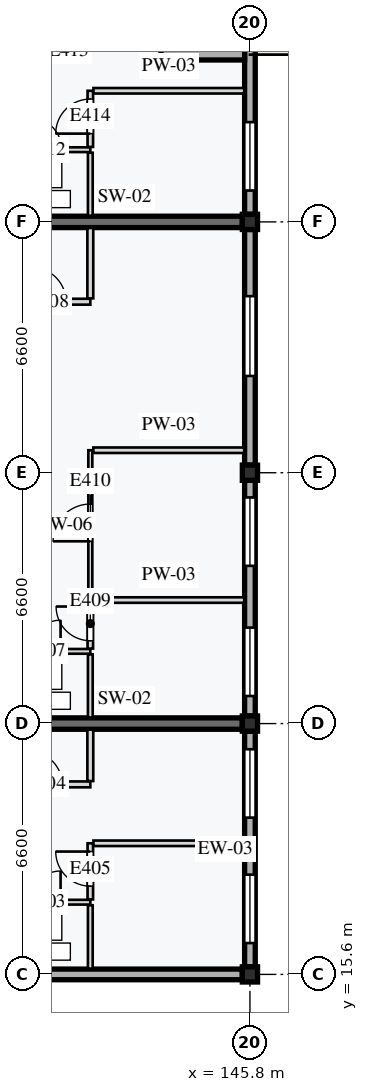
"""IFC4 building model, lengths in metres.
Left out: names, types, materials, properties, quantities, classifications, styles, units other than length and angle.
Written with IfcOpenShell. Run it as: python <this file> out.ifc"""

import sys

from ifc_helpers import new_model, si_unit, direction, frame, frame_2d, origin, origin_2d, place, context, subcontext, project, spatial, rectangle, extrude, element, fill, save


model = new_model("IFC4")
c1 = context("Model", 3, precision=1e-05, world=origin(), true_north=direction((0.0, 1.0)))
c2 = subcontext(c1, "Body", "Model", "MODEL_VIEW")
j1 = project(units=[si_unit("LENGTHUNIT", "METRE"), si_unit("PLANEANGLEUNIT", "RADIAN")], contexts=[c1])
p1 = place(None, origin())
s1 = spatial("IfcSite", under=j1, at=p1, CompositionType="ELEMENT")
p2 = place(p1, origin())
s2 = spatial("IfcBuilding", under=s1, at=p2, CompositionType="ELEMENT")
p3 = place(p2, frame((0.0, 0.0, 34.0)))
s3 = spatial("IfcBuildingStorey", under=s2, at=p3, CompositionType="ELEMENT", Elevation=34.0)
for number, where, z_axis, x_axis in (
    (1, (145.8, 15.6, 0.0), (0.0, 0.0, 1.0), (1.0, 0.0, 0.0)),
    (2, (145.8, 22.2, 0.0), (0.0, 0.0, 1.0), (1.0, 0.0, 0.0)),
    (3, (145.8, 28.8, 0.0), (0.0, 0.0, 1.0), (1.0, 0.0, 0.0)),
    (4, (145.8, 35.4, 0.0), (0.0, 0.0, 1.0), (1.0, 0.0, 0.0)),
):
    element("IfcColumn", number, at=place(p3, frame(where, z_axis=z_axis, x_axis=x_axis)), inside=s3, PredefinedType="COLUMN", context=c2, shape_type="SweptSolid", body=[
        extrude(rectangle(XDim=0.4, YDim=0.4, at=origin_2d()), origin(), (0.0, 0.0, 1.0), 3.2),
    ])
for number, where, z_axis, x_axis in (
    (5, (139.4, 22.2, 0.0), (0.0, 0.0, 1.0), (1.0, 0.0, 0.0)),
    (6, (139.4, 35.4, 0.0), (0.0, 0.0, 1.0), (1.0, 0.0, 0.0)),
):
    element("IfcWall", number, at=place(p3, frame(where, z_axis=z_axis, x_axis=x_axis)), inside=s3, PredefinedType="SHEAR", context=c2, shape_type="SweptSolid", body=[
        extrude(rectangle(XDim=6.2, YDim=0.3, at=frame_2d((3.1, 0.0))), origin(), (0.0, 0.0, 1.0), 2.97),
    ])
p4 = place(p3, frame((145.8, 15.8, 0.0), z_axis=(0.0, 0.0, 1.0), x_axis=(0.0, 1.0, 0.0)))
e7 = element("IfcWall", 7, at=p4, inside=s3, PredefinedType="STANDARD", context=c2, shape_type="SweptSolid", body=[
    extrude(rectangle(XDim=6.2, YDim=0.28, at=frame_2d((3.1, 0.0))), origin(), (0.0, 0.0, 1.0), 2.6),
])
p5 = place(p4, frame((0.625, 0.0, 0.85)))
e8 = element("IfcOpeningElement", 8, at=p5, cuts=e7, PredefinedType="OPENING", context=c2, shape_type="SweptSolid", body=[
    extrude(rectangle(XDim=1.8, YDim=1.35, at=frame_2d((0.9, 0.675))), frame((0.0, 0.15, 0.0), z_axis=(0.0, -1.0, 0.0), x_axis=(1.0, 0.0, 0.0)), (0.0, 0.0, 1.0), 0.3),
])
p6 = place(p4, frame((3.925, 0.0, 0.85)))
e9 = element("IfcOpeningElement", 9, at=p6, cuts=e7, PredefinedType="OPENING", context=c2, shape_type="SweptSolid", body=[
    extrude(rectangle(XDim=1.8, YDim=1.55, at=frame_2d((0.9, 0.775))), frame((0.0, 0.15, 0.0), z_axis=(0.0, -1.0, 0.0), x_axis=(1.0, 0.0, 0.0)), (0.0, 0.0, 1.0), 0.3),
])
p7 = place(p3, frame((145.8, 22.4, 0.0), z_axis=(0.0, 0.0, 1.0), x_axis=(0.0, 1.0, 0.0)))
e10 = element("IfcWall", 10, at=p7, inside=s3, PredefinedType="STANDARD", context=c2, shape_type="SweptSolid", body=[
    extrude(rectangle(XDim=6.2, YDim=0.28, at=frame_2d((3.1, 0.0))), origin(), (0.0, 0.0, 1.0), 2.6),
])
p8 = place(p7, frame((0.525, 0.0, 0.85)))
e11 = element("IfcOpeningElement", 11, at=p8, cuts=e10, PredefinedType="OPENING", context=c2, shape_type="SweptSolid", body=[
    extrude(rectangle(XDim=1.8, YDim=1.35, at=frame_2d((0.9, 0.675))), frame((0.0, 0.15, 0.0), z_axis=(0.0, -1.0, 0.0), x_axis=(1.0, 0.0, 0.0)), (0.0, 0.0, 1.0), 0.3),
])
p9 = place(p7, frame((3.95, 0.0, 0.85)))
e12 = element("IfcOpeningElement", 12, at=p9, cuts=e10, PredefinedType="OPENING", context=c2, shape_type="SweptSolid", body=[
    extrude(rectangle(XDim=1.8, YDim=1.35, at=frame_2d((0.9, 0.675))), frame((0.0, 0.15, 0.0), z_axis=(0.0, -1.0, 0.0), x_axis=(1.0, 0.0, 0.0)), (0.0, 0.0, 1.0), 0.3),
])
p10 = place(p3, frame((145.8, 29.0, 0.0), z_axis=(0.0, 0.0, 1.0), x_axis=(0.0, 1.0, 0.0)))
e13 = element("IfcWall", 13, at=p10, inside=s3, PredefinedType="STANDARD", context=c2, shape_type="SweptSolid", body=[
    extrude(rectangle(XDim=6.2, YDim=0.28, at=frame_2d((3.1, 0.0))), origin(), (0.0, 0.0, 1.0), 2.6),
])
p11 = place(p10, frame((2.346, 0.0, 0.85)))
e14 = element("IfcOpeningElement", 14, at=p11, cuts=e13, PredefinedType="OPENING", context=c2, shape_type="SweptSolid", body=[
    extrude(rectangle(XDim=2.1, YDim=1.55, at=frame_2d((1.05, 0.775))), frame((0.0, 0.15, 0.0), z_axis=(0.0, -1.0, 0.0), x_axis=(1.0, 0.0, 0.0)), (0.0, 0.0, 1.0), 0.3),
])
p12 = place(p3, frame((145.8, 35.6, 0.0), z_axis=(0.0, 0.0, 1.0), x_axis=(0.0, 1.0, 0.0)))
e15 = element("IfcWall", 15, at=p12, inside=s3, PredefinedType="STANDARD", context=c2, shape_type="SweptSolid", body=[
    extrude(rectangle(XDim=4.34, YDim=0.28, at=frame_2d((2.17, 0.0))), origin(), (0.0, 0.0, 1.0), 2.6),
])
p13 = place(p12, frame((0.625, 0.0, 0.85)))
e16 = element("IfcOpeningElement", 16, at=p13, cuts=e15, PredefinedType="OPENING", context=c2, shape_type="SweptSolid", body=[
    extrude(rectangle(XDim=1.8, YDim=1.35, at=frame_2d((0.9, 0.675))), frame((0.0, 0.15, 0.0), z_axis=(0.0, -1.0, 0.0), x_axis=(1.0, 0.0, 0.0)), (0.0, 0.0, 1.0), 0.3),
])
p14 = place(p3, frame((145.66, 39.8, 0.0), z_axis=(0.0, 0.0, 1.0), x_axis=(-1.0, 0.0, 0.0)))
e17 = element("IfcWall", 17, at=p14, inside=s3, PredefinedType="STANDARD", context=c2, shape_type="SweptSolid", body=[
    extrude(rectangle(XDim=2.2, YDim=0.28, at=frame_2d((1.1, 0.0))), origin(), (0.0, 0.0, 1.0), 2.97),
])
p15 = place(p3, frame((139.4, 15.6, 0.0), z_axis=(0.0, 0.0, 1.0), x_axis=(1.0, 0.0, 0.0)))
e18 = element("IfcWall", 18, at=p15, inside=s3, PredefinedType="STANDARD", context=c2, shape_type="SweptSolid", body=[
    extrude(rectangle(XDim=6.2, YDim=0.28, at=frame_2d((3.1, 0.0))), origin(), (0.0, 0.0, 1.0), 2.65),
])
p16 = place(p3, frame((139.298, 17.5, 0.0), z_axis=(0.0, 0.0, 1.0), x_axis=(1.0, 0.0, 0.0)))
e19 = element("IfcWall", 19, at=p16, inside=s3, PredefinedType="PARTITIONING", context=c2, shape_type="SweptSolid", body=[
    extrude(rectangle(XDim=2.302, YDim=0.125, at=frame_2d((1.151, 0.0))), origin(), (0.0, 0.0, 1.0), 2.935),
])
p17 = place(p16, frame((0.7, 0.0, 0.0)))
e20 = element("IfcOpeningElement", 20, at=p17, cuts=e19, PredefinedType="OPENING", context=c2, shape_type="SweptSolid", body=[
    extrude(rectangle(XDim=0.82, YDim=2.05, at=frame_2d((0.41, 1.025))), frame((0.0, 0.073, 0.0), z_axis=(0.0, -1.0, 0.0), x_axis=(1.0, 0.0, 0.0)), (0.0, 0.0, 1.0), 0.145),
])
p18 = place(p3, frame((141.6, 15.75, 0.0), z_axis=(0.0, 0.0, 1.0), x_axis=(0.0, 1.0, 0.0)))
e21 = element("IfcWall", 21, at=p18, inside=s3, PredefinedType="PARTITIONING", context=c2, shape_type="SweptSolid", body=[
    extrude(rectangle(XDim=1.67, YDim=0.125, at=frame_2d((0.835, 0.0))), origin(), (0.0, 0.0, 1.0), 2.935),
])
p19 = place(p3, frame((139.298, 20.6, 0.0), z_axis=(0.0, 0.0, 1.0), x_axis=(1.0, 0.0, 0.0)))
e22 = element("IfcWall", 22, at=p19, inside=s3, PredefinedType="PARTITIONING", context=c2, shape_type="SweptSolid", body=[
    extrude(rectangle(XDim=2.302, YDim=0.155, at=frame_2d((1.151, 0.0))), origin(), (0.0, 0.0, 1.0), 2.935),
])
p20 = place(p19, frame((0.7, 0.0, 0.0)))
e23 = element("IfcOpeningElement", 23, at=p20, cuts=e22, PredefinedType="OPENING", context=c2, shape_type="SweptSolid", body=[
    extrude(rectangle(XDim=0.86, YDim=2.12, at=frame_2d((0.43, 1.06))), frame((0.0, 0.087, 0.0), z_axis=(0.0, -1.0, 0.0), x_axis=(1.0, 0.0, 0.0)), (0.0, 0.0, 1.0), 0.175),
])
p21 = place(p3, frame((141.6, 20.688, 0.0), z_axis=(0.0, 0.0, 1.0), x_axis=(0.0, 1.0, 0.0)))
e24 = element("IfcWall", 24, at=p21, inside=s3, PredefinedType="PARTITIONING", context=c2, shape_type="SweptSolid", body=[
    extrude(rectangle(XDim=1.353, YDim=0.155, at=frame_2d((0.676, 0.0))), origin(), (0.0, 0.0, 1.0), 2.935),
])
p22 = place(p3, frame((141.6, 17.573, 0.0), z_axis=(0.0, 0.0, 1.0), x_axis=(0.0, 1.0, 0.0)))
e25 = element("IfcWall", 25, at=p22, inside=s3, PredefinedType="PARTITIONING", context=c2, shape_type="SweptSolid", body=[
    extrude(rectangle(XDim=1.478, YDim=0.145, at=frame_2d((0.739, 0.0))), origin(), (0.0, 0.0, 1.0), 2.935),
])
p23 = place(p22, frame((0.35, 0.0, 0.0)))
e26 = element("IfcOpeningElement", 26, at=p23, cuts=e25, PredefinedType="OPENING", context=c2, shape_type="SweptSolid", body=[
    extrude(rectangle(XDim=0.91, YDim=2.14, at=frame_2d((0.455, 1.07))), frame((0.0, 0.083, 0.0), z_axis=(0.0, -1.0, 0.0), x_axis=(1.0, 0.0, 0.0)), (0.0, 0.0, 1.0), 0.165),
])
p24 = place(p3, frame((141.683, 19.05, 0.0), z_axis=(0.0, 0.0, 1.0), x_axis=(1.0, 0.0, 0.0)))
e27 = element("IfcWall", 27, at=p24, inside=s3, PredefinedType="PARTITIONING", context=c2, shape_type="SweptSolid", body=[
    extrude(rectangle(XDim=3.967, YDim=0.145, at=frame_2d((1.984, 0.0))), origin(), (0.0, 0.0, 1.0), 2.935),
])
p25 = place(p3, frame((139.298, 24.1, 0.0), z_axis=(0.0, 0.0, 1.0), x_axis=(1.0, 0.0, 0.0)))
e28 = element("IfcWall", 28, at=p25, inside=s3, PredefinedType="PARTITIONING", context=c2, shape_type="SweptSolid", body=[
    extrude(rectangle(XDim=2.302, YDim=0.125, at=frame_2d((1.151, 0.0))), origin(), (0.0, 0.0, 1.0), 2.935),
])
p26 = place(p25, frame((0.7, 0.0, 0.0)))
e29 = element("IfcOpeningElement", 29, at=p26, cuts=e28, PredefinedType="OPENING", context=c2, shape_type="SweptSolid", body=[
    extrude(rectangle(XDim=0.82, YDim=2.05, at=frame_2d((0.41, 1.025))), frame((0.0, 0.073, 0.0), z_axis=(0.0, -1.0, 0.0), x_axis=(1.0, 0.0, 0.0)), (0.0, 0.0, 1.0), 0.145),
])
p27 = place(p3, frame((141.6, 22.36, 0.0), z_axis=(0.0, 0.0, 1.0), x_axis=(0.0, 1.0, 0.0)))
e30 = element("IfcWall", 30, at=p27, inside=s3, PredefinedType="PARTITIONING", context=c2, shape_type="SweptSolid", body=[
    extrude(rectangle(XDim=1.66, YDim=0.125, at=frame_2d((0.83, 0.0))), origin(), (0.0, 0.0, 1.0), 2.935),
])
p28 = place(p3, frame((139.36, 33.3, 0.0), z_axis=(0.0, 0.0, 1.0), x_axis=(1.0, 0.0, 0.0)))
e31 = element("IfcWall", 31, at=p28, inside=s3, PredefinedType="PARTITIONING", context=c2, shape_type="SweptSolid", body=[
    extrude(rectangle(XDim=2.24, YDim=0.155, at=frame_2d((1.12, 0.0))), origin(), (0.0, 0.0, 1.0), 2.935),
])
p29 = place(p28, frame((0.7, 0.0, 0.0)))
e32 = element("IfcOpeningElement", 32, at=p29, cuts=e31, PredefinedType="OPENING", context=c2, shape_type="SweptSolid", body=[
    extrude(rectangle(XDim=0.9, YDim=2.1, at=frame_2d((0.45, 1.05))), frame((0.0, 0.087, 0.0), z_axis=(0.0, -1.0, 0.0), x_axis=(1.0, 0.0, 0.0)), (0.0, 0.0, 1.0), 0.175),
])
p30 = place(p3, frame((141.6, 33.387, 0.0), z_axis=(0.0, 0.0, 1.0), x_axis=(0.0, 1.0, 0.0)))
e33 = element("IfcWall", 33, at=p30, inside=s3, PredefinedType="PARTITIONING", context=c2, shape_type="SweptSolid", body=[
    extrude(rectangle(XDim=1.853, YDim=0.155, at=frame_2d((0.926, 0.0))), origin(), (0.0, 0.0, 1.0), 2.935),
])
p31 = place(p3, frame((141.6, 24.173, 0.0), z_axis=(0.0, 0.0, 1.0), x_axis=(0.0, 1.0, 0.0)))
e34 = element("IfcWall", 34, at=p31, inside=s3, PredefinedType="PARTITIONING", context=c2, shape_type="SweptSolid", body=[
    extrude(rectangle(XDim=1.277, YDim=0.145, at=frame_2d((0.639, 0.0))), origin(), (0.0, 0.0, 1.0), 2.935),
])
p32 = place(p31, frame((0.208, 0.0, 0.0)))
e35 = element("IfcOpeningElement", 35, at=p32, cuts=e34, PredefinedType="OPENING", context=c2, shape_type="SweptSolid", body=[
    extrude(rectangle(XDim=0.9, YDim=2.16, at=frame_2d((0.45, 1.08))), frame((0.0, 0.083, 0.0), z_axis=(0.0, -1.0, 0.0), x_axis=(1.0, 0.0, 0.0)), (0.0, 0.0, 1.0), 0.165),
])
p33 = place(p3, frame((141.683, 25.45, 0.0), z_axis=(0.0, 0.0, 1.0), x_axis=(1.0, 0.0, 0.0)))
e36 = element("IfcWall", 36, at=p33, inside=s3, PredefinedType="PARTITIONING", context=c2, shape_type="SweptSolid", body=[
    extrude(rectangle(XDim=3.967, YDim=0.145, at=frame_2d((1.984, 0.0))), origin(), (0.0, 0.0, 1.0), 2.935),
])
p34 = place(p3, frame((141.6, 25.45, 0.0), z_axis=(0.0, 0.0, 1.0), x_axis=(0.0, 1.0, 0.0)))
e37 = element("IfcWall", 37, at=p34, inside=s3, PredefinedType="PARTITIONING", context=c2, shape_type="SweptSolid", body=[
    extrude(rectangle(XDim=3.942, YDim=0.105, at=frame_2d((1.971, 0.0))), origin(), (0.0, 0.0, 1.0), 2.935),
])
p35 = place(p34, frame((1.546, 0.0, 0.0)))
e38 = element("IfcOpeningElement", 38, at=p35, cuts=e37, PredefinedType="OPENING", context=c2, shape_type="SweptSolid", body=[
    extrude(rectangle(XDim=0.98, YDim=2.12, at=frame_2d((0.49, 1.06))), frame((0.0, 0.062, 0.0), z_axis=(0.0, -1.0, 0.0), x_axis=(1.0, 0.0, 0.0)), (0.0, 0.0, 1.0), 0.125),
])
p36 = place(p3, frame((141.68, 29.392, 0.0), z_axis=(0.0, 0.0, 1.0), x_axis=(1.0, 0.0, 0.0)))
e39 = element("IfcWall", 39, at=p36, inside=s3, PredefinedType="PARTITIONING", context=c2, shape_type="SweptSolid", body=[
    extrude(rectangle(XDim=3.97, YDim=0.145, at=frame_2d((1.985, 0.0))), origin(), (0.0, 0.0, 1.0), 2.935),
])
p37 = place(p3, frame((139.298, 37.3, 0.0), z_axis=(0.0, 0.0, 1.0), x_axis=(1.0, 0.0, 0.0)))
e40 = element("IfcWall", 40, at=p37, inside=s3, PredefinedType="PARTITIONING", context=c2, shape_type="SweptSolid", body=[
    extrude(rectangle(XDim=2.302, YDim=0.125, at=frame_2d((1.151, 0.0))), origin(), (0.0, 0.0, 1.0), 2.935),
])
p38 = place(p37, frame((0.7, 0.0, 0.0)))
e41 = element("IfcOpeningElement", 41, at=p38, cuts=e40, PredefinedType="OPENING", context=c2, shape_type="SweptSolid", body=[
    extrude(rectangle(XDim=0.85, YDim=2.04, at=frame_2d((0.425, 1.02))), frame((0.0, 0.073, 0.0), z_axis=(0.0, -1.0, 0.0), x_axis=(1.0, 0.0, 0.0)), (0.0, 0.0, 1.0), 0.145),
])
p39 = place(p3, frame((141.6, 35.56, 0.0), z_axis=(0.0, 0.0, 1.0), x_axis=(0.0, 1.0, 0.0)))
e42 = element("IfcWall", 42, at=p39, inside=s3, PredefinedType="PARTITIONING", context=c2, shape_type="SweptSolid", body=[
    extrude(rectangle(XDim=1.66, YDim=0.125, at=frame_2d((0.83, 0.0))), origin(), (0.0, 0.0, 1.0), 2.935),
])
p40 = place(p3, frame((139.298, 39.9, 0.0), z_axis=(0.0, 0.0, 1.0), x_axis=(1.0, 0.0, 0.0)))
e43 = element("IfcWall", 43, at=p40, inside=s3, PredefinedType="PARTITIONING", context=c2, shape_type="SweptSolid", body=[
    extrude(rectangle(XDim=2.302, YDim=0.155, at=frame_2d((1.151, 0.0))), origin(), (0.0, 0.0, 1.0), 2.935),
])
p41 = place(p40, frame((0.7, 0.0, 0.0)))
e44 = element("IfcOpeningElement", 44, at=p41, cuts=e43, PredefinedType="OPENING", context=c2, shape_type="SweptSolid", body=[
    extrude(rectangle(XDim=0.86, YDim=2.12, at=frame_2d((0.43, 1.06))), frame((0.0, 0.087, 0.0), z_axis=(0.0, -1.0, 0.0), x_axis=(1.0, 0.0, 0.0)), (0.0, 0.0, 1.0), 0.175),
])
p42 = place(p3, frame((141.6, 37.373, 0.0), z_axis=(0.0, 0.0, 1.0), x_axis=(0.0, 1.0, 0.0)))
e45 = element("IfcWall", 45, at=p42, inside=s3, PredefinedType="PARTITIONING", context=c2, shape_type="SweptSolid", body=[
    extrude(rectangle(XDim=1.478, YDim=0.145, at=frame_2d((0.739, 0.0))), origin(), (0.0, 0.0, 1.0), 2.935),
])
p43 = place(p42, frame((0.35, 0.0, 0.0)))
e46 = element("IfcOpeningElement", 46, at=p43, cuts=e45, PredefinedType="OPENING", context=c2, shape_type="SweptSolid", body=[
    extrude(rectangle(XDim=0.91, YDim=2.14, at=frame_2d((0.455, 1.07))), frame((0.0, 0.083, 0.0), z_axis=(0.0, -1.0, 0.0), x_axis=(1.0, 0.0, 0.0)), (0.0, 0.0, 1.0), 0.165),
])
p44 = place(p3, frame((141.683, 38.85, 0.0), z_axis=(0.0, 0.0, 1.0), x_axis=(1.0, 0.0, 0.0)))
e47 = element("IfcWall", 47, at=p44, inside=s3, PredefinedType="PARTITIONING", context=c2, shape_type="SweptSolid", body=[
    extrude(rectangle(XDim=3.967, YDim=0.145, at=frame_2d((1.984, 0.0))), origin(), (0.0, 0.0, 1.0), 2.935),
])
p45 = place(p5, origin())
e48 = element("IfcWindow", 48, at=p45, inside=s3, PartitioningType="SINGLE_PANEL", PredefinedType="WINDOW", context=c2, shape_type="SweptSolid", body=[
    extrude(rectangle(XDim=1.8, YDim=1.35, at=frame_2d((0.9, 0.675))), frame((0.0, 0.03, 0.0), z_axis=(0.0, -1.0, 0.0), x_axis=(1.0, 0.0, 0.0)), (0.0, 0.0, 1.0), 0.06),
])
fill(e8, e48)
p46 = place(p6, origin())
e49 = element("IfcWindow", 49, at=p46, inside=s3, PartitioningType="SINGLE_PANEL", PredefinedType="WINDOW", context=c2, shape_type="SweptSolid", body=[
    extrude(rectangle(XDim=1.8, YDim=1.55, at=frame_2d((0.9, 0.775))), frame((0.0, 0.03, 0.0), z_axis=(0.0, -1.0, 0.0), x_axis=(1.0, 0.0, 0.0)), (0.0, 0.0, 1.0), 0.06),
])
fill(e9, e49)
p47 = place(p8, origin())
e50 = element("IfcWindow", 50, at=p47, inside=s3, PartitioningType="SINGLE_PANEL", PredefinedType="WINDOW", context=c2, shape_type="SweptSolid", body=[
    extrude(rectangle(XDim=1.8, YDim=1.35, at=frame_2d((0.9, 0.675))), frame((0.0, 0.03, 0.0), z_axis=(0.0, -1.0, 0.0), x_axis=(1.0, 0.0, 0.0)), (0.0, 0.0, 1.0), 0.06),
])
fill(e11, e50)
p48 = place(p9, origin())
e51 = element("IfcWindow", 51, at=p48, inside=s3, PartitioningType="SINGLE_PANEL", PredefinedType="WINDOW", context=c2, shape_type="SweptSolid", body=[
    extrude(rectangle(XDim=1.8, YDim=1.35, at=frame_2d((0.9, 0.675))), frame((0.0, 0.03, 0.0), z_axis=(0.0, -1.0, 0.0), x_axis=(1.0, 0.0, 0.0)), (0.0, 0.0, 1.0), 0.06),
])
fill(e12, e51)
p49 = place(p11, origin())
e52 = element("IfcWindow", 52, at=p49, inside=s3, PartitioningType="SINGLE_PANEL", PredefinedType="WINDOW", context=c2, shape_type="SweptSolid", body=[
    extrude(rectangle(XDim=2.1, YDim=1.55, at=frame_2d((1.05, 0.775))), frame((0.0, 0.03, 0.0), z_axis=(0.0, -1.0, 0.0), x_axis=(1.0, 0.0, 0.0)), (0.0, 0.0, 1.0), 0.06),
])
fill(e14, e52)
p50 = place(p13, origin())
e53 = element("IfcWindow", 53, at=p50, inside=s3, PartitioningType="SINGLE_PANEL", PredefinedType="WINDOW", context=c2, shape_type="SweptSolid", body=[
    extrude(rectangle(XDim=1.8, YDim=1.35, at=frame_2d((0.9, 0.675))), frame((0.0, 0.03, 0.0), z_axis=(0.0, -1.0, 0.0), x_axis=(1.0, 0.0, 0.0)), (0.0, 0.0, 1.0), 0.06),
])
fill(e16, e53)
p51 = place(p17, origin())
e54 = element("IfcDoor", 54, at=p51, inside=s3, OperationType="SINGLE_SWING_RIGHT", PredefinedType="DOOR", context=c2, shape_type="SweptSolid", body=[
    extrude(rectangle(XDim=0.82, YDim=2.05, at=frame_2d((0.41, 1.025))), frame((0.0, 0.025, 0.0), z_axis=(0.0, -1.0, 0.0), x_axis=(1.0, 0.0, 0.0)), (0.0, 0.0, 1.0), 0.05),
])
fill(e20, e54)
p52 = place(p20, origin())
e55 = element("IfcDoor", 55, at=p52, inside=s3, OperationType="SINGLE_SWING_LEFT", PredefinedType="DOOR", context=c2, shape_type="SweptSolid", body=[
    extrude(rectangle(XDim=0.86, YDim=2.12, at=frame_2d((0.43, 1.06))), frame((0.0, 0.025, 0.0), z_axis=(0.0, -1.0, 0.0), x_axis=(1.0, 0.0, 0.0)), (0.0, 0.0, 1.0), 0.05),
])
fill(e23, e55)
p53 = place(p23, origin())
e56 = element("IfcDoor", 56, at=p53, inside=s3, OperationType="SINGLE_SWING_RIGHT", PredefinedType="DOOR", context=c2, shape_type="SweptSolid", body=[
    extrude(rectangle(XDim=0.91, YDim=2.14, at=frame_2d((0.455, 1.07))), frame((0.0, 0.025, 0.0), z_axis=(0.0, -1.0, 0.0), x_axis=(1.0, 0.0, 0.0)), (0.0, 0.0, 1.0), 0.05),
])
fill(e26, e56)
p54 = place(p26, origin())
e57 = element("IfcDoor", 57, at=p54, inside=s3, OperationType="SINGLE_SWING_RIGHT", PredefinedType="DOOR", context=c2, shape_type="SweptSolid", body=[
    extrude(rectangle(XDim=0.82, YDim=2.05, at=frame_2d((0.41, 1.025))), frame((0.0, 0.025, 0.0), z_axis=(0.0, -1.0, 0.0), x_axis=(1.0, 0.0, 0.0)), (0.0, 0.0, 1.0), 0.05),
])
fill(e29, e57)
p55 = place(p29, origin())
e58 = element("IfcDoor", 58, at=p55, inside=s3, OperationType="SINGLE_SWING_LEFT", PredefinedType="DOOR", context=c2, shape_type="SweptSolid", body=[
    extrude(rectangle(XDim=0.9, YDim=2.1, at=frame_2d((0.45, 1.05))), frame((0.0, 0.025, 0.0), z_axis=(0.0, -1.0, 0.0), x_axis=(1.0, 0.0, 0.0)), (0.0, 0.0, 1.0), 0.05),
])
fill(e32, e58)
p56 = place(p32, origin())
e59 = element("IfcDoor", 59, at=p56, inside=s3, OperationType="SINGLE_SWING_RIGHT", PredefinedType="DOOR", context=c2, shape_type="SweptSolid", body=[
    extrude(rectangle(XDim=0.9, YDim=2.16, at=frame_2d((0.45, 1.08))), frame((0.0, 0.025, 0.0), z_axis=(0.0, -1.0, 0.0), x_axis=(1.0, 0.0, 0.0)), (0.0, 0.0, 1.0), 0.05),
])
fill(e35, e59)
p57 = place(p35, origin())
e60 = element("IfcDoor", 60, at=p57, inside=s3, OperationType="SINGLE_SWING_LEFT", PredefinedType="DOOR", context=c2, shape_type="SweptSolid", body=[
    extrude(rectangle(XDim=0.98, YDim=2.12, at=frame_2d((0.49, 1.06))), frame((0.0, 0.025, 0.0), z_axis=(0.0, -1.0, 0.0), x_axis=(1.0, 0.0, 0.0)), (0.0, 0.0, 1.0), 0.05),
])
fill(e38, e60)
p58 = place(p38, origin())
e61 = element("IfcDoor", 61, at=p58, inside=s3, OperationType="SINGLE_SWING_LEFT", PredefinedType="DOOR", context=c2, shape_type="SweptSolid", body=[
    extrude(rectangle(XDim=0.85, YDim=2.04, at=frame_2d((0.425, 1.02))), frame((0.0, 0.025, 0.0), z_axis=(0.0, -1.0, 0.0), x_axis=(1.0, 0.0, 0.0)), (0.0, 0.0, 1.0), 0.05),
])
fill(e41, e61)
p59 = place(p43, origin())
e62 = element("IfcDoor", 62, at=p59, inside=s3, OperationType="SINGLE_SWING_LEFT", PredefinedType="DOOR", context=c2, shape_type="SweptSolid", body=[
    extrude(rectangle(XDim=0.91, YDim=2.14, at=frame_2d((0.455, 1.07))), frame((0.0, 0.025, 0.0), z_axis=(0.0, -1.0, 0.0), x_axis=(1.0, 0.0, 0.0)), (0.0, 0.0, 1.0), 0.05),
])
fill(e46, e62)
save(model, sys.argv[1])
